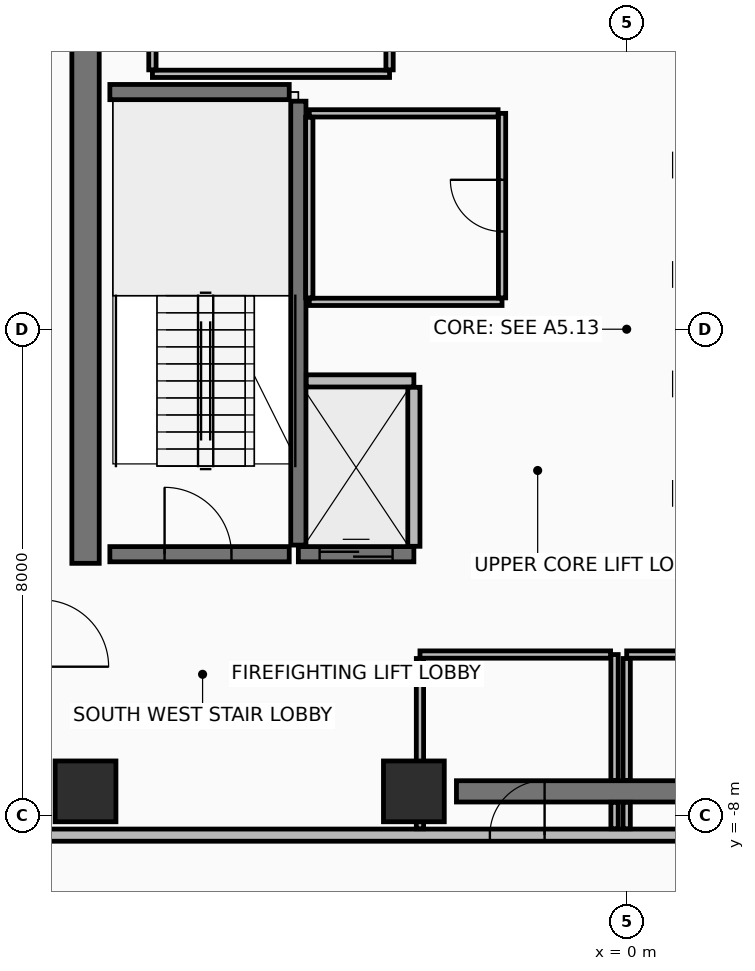
"""IFC4 building model, lengths in metres.
Left out: names, types, materials, properties, quantities, classifications, styles, units other than length and angle.
Written with IfcOpenShell. Run it as: python <this file> out.ifc"""

import sys

from ifc_helpers import new_model, si_unit, direction, frame, frame_2d, origin, origin_2d, place, context, subcontext, project, spatial, rectangle, extrude, element, fill, save


model = new_model("IFC4")
c1 = context("Model", 3, precision=1e-05, world=origin(), true_north=direction((0.0, 1.0)))
c2 = subcontext(c1, "Body", "Model", "MODEL_VIEW")
j1 = project(units=[si_unit("LENGTHUNIT", "METRE"), si_unit("PLANEANGLEUNIT", "RADIAN")], contexts=[c1])
p1 = place(None, origin())
s1 = spatial("IfcSite", under=j1, at=p1, CompositionType="ELEMENT")
p2 = place(p1, origin())
s2 = spatial("IfcBuilding", under=s1, at=p2, CompositionType="ELEMENT")
p3 = place(p2, frame((0.0, 0.0, 302.15)))
s3 = spatial("IfcBuildingStorey", under=s2, at=p3, CompositionType="ELEMENT", Elevation=302.15)
for number, where, z_axis, x_axis in (
    (1, (-8.9, -7.6, 0.0), (0.0, 0.0, 1.0), (1.0, 0.0, 0.0)),
    (2, (-3.5, -7.6, 0.0), (0.0, 0.0, 1.0), (1.0, 0.0, 0.0)),
):
    element("IfcColumn", number, at=place(p3, frame(where, z_axis=z_axis, x_axis=x_axis)), inside=s3, PredefinedType="COLUMN", context=c2, shape_type="SweptSolid", body=[
        extrude(rectangle(XDim=1.0, YDim=1.0, at=origin_2d()), origin(), (0.0, 0.0, 1.0), 4.15),
    ])
p4 = place(p3, frame((-2.8, -7.6, 0.0), z_axis=(0.0, 0.0, 1.0), x_axis=(1.0, 0.0, 0.0)))
e3 = element("IfcWall", 3, at=p4, inside=s3, PredefinedType="SHEAR", context=c2, shape_type="SweptSolid", body=[
    extrude(rectangle(XDim=5.38, YDim=0.35, at=frame_2d((2.69, 0.0))), origin(), (0.0, 0.0, 1.0), 3.95),
])
p5 = place(p3, frame((-8.9, -3.85, 0.0), z_axis=(0.0, 0.0, 1.0), x_axis=(0.0, 1.0, 0.0)))
e4 = element("IfcWall", 4, at=p5, inside=s3, PredefinedType="SHEAR", context=c2, shape_type="SweptSolid", body=[
    extrude(rectangle(XDim=10.7, YDim=0.45, at=frame_2d((5.35, 0.0))), origin(), (0.0, 0.0, 1.0), 3.95),
])
p6 = place(p3, frame((-9.62, -8.32, 0.0), z_axis=(0.0, 0.0, 1.0), x_axis=(1.0, 0.0, 0.0)))
e5 = element("IfcWall", 5, at=p6, inside=s3, PredefinedType="PARTITIONING", context=c2, shape_type="SweptSolid", body=[
    extrude(rectangle(XDim=19.24, YDim=0.2, at=frame_2d((9.62, 0.0))), origin(), (0.0, 0.0, 1.0), 3.445),
])
p7 = place(p6, frame((7.37, 0.0, 0.0)))
e6 = element("IfcOpeningElement", 6, at=p7, cuts=e5, PredefinedType="OPENING", context=c2, shape_type="SweptSolid", body=[
    extrude(rectangle(XDim=0.9, YDim=2.1, at=frame_2d((0.45, 1.05))), frame((0.0, 0.11, 0.0), z_axis=(0.0, -1.0, 0.0), x_axis=(1.0, 0.0, 0.0)), (0.0, 0.0, 1.0), 0.22),
])
p8 = place(p6, frame((10.77, 0.0, 0.0)))
e7 = element("IfcOpeningElement", 7, at=p8, cuts=e5, PredefinedType="OPENING", context=c2, shape_type="SweptSolid", body=[
    extrude(rectangle(XDim=0.9, YDim=2.1, at=frame_2d((0.45, 1.05))), frame((0.0, 0.11, 0.0), z_axis=(0.0, -1.0, 0.0), x_axis=(1.0, 0.0, 0.0)), (0.0, 0.0, 1.0), 0.22),
])
p9 = place(p3, frame((-5.4, -3.55, 0.0), z_axis=(0.0, 0.0, 1.0), x_axis=(0.0, 1.0, 0.0)))
e8 = element("IfcWall", 8, at=p9, inside=s3, PredefinedType="SHEAR", context=c2, shape_type="SweptSolid", body=[
    extrude(rectangle(XDim=7.3, YDim=0.25, at=frame_2d((3.65, 0.0))), origin(), (0.0, 0.0, 1.0), 3.95),
])
p10 = place(p3, frame((-8.5, -3.7, 0.0), z_axis=(0.0, 0.0, 1.0), x_axis=(1.0, 0.0, 0.0)))
e9 = element("IfcWall", 9, at=p10, inside=s3, PredefinedType="SHEAR", context=c2, shape_type="SweptSolid", body=[
    extrude(rectangle(XDim=2.95, YDim=0.25, at=frame_2d((1.475, 0.0))), origin(), (0.0, 0.0, 1.0), 3.95),
])
p11 = place(p10, frame((0.9, 0.0, 0.0)))
e10 = element("IfcOpeningElement", 10, at=p11, cuts=e9, PredefinedType="OPENING", context=c2, shape_type="SweptSolid", body=[
    extrude(rectangle(XDim=1.1, YDim=2.15, at=frame_2d((0.55, 1.075))), frame((0.0, 0.135, 0.0), z_axis=(0.0, -1.0, 0.0), x_axis=(1.0, 0.0, 0.0)), (0.0, 0.0, 1.0), 0.27),
])
p12 = place(p3, frame((-8.5, 3.9, 0.0), z_axis=(0.0, 0.0, 1.0), x_axis=(1.0, 0.0, 0.0)))
e11 = element("IfcWall", 11, at=p12, inside=s3, PredefinedType="SHEAR", context=c2, shape_type="SweptSolid", body=[
    extrude(rectangle(XDim=2.95, YDim=0.25, at=frame_2d((1.475, 0.0))), origin(), (0.0, 0.0, 1.0), 3.95),
])
p13 = place(p3, frame((-5.4, -3.7, 0.0), z_axis=(0.0, 0.0, 1.0), x_axis=(1.0, 0.0, 0.0)))
e12 = element("IfcWall", 12, at=p13, inside=s3, PredefinedType="SHEAR", context=c2, shape_type="SweptSolid", body=[
    extrude(rectangle(XDim=1.9, YDim=0.25, at=frame_2d((0.95, 0.0))), origin(), (0.0, 0.0, 1.0), 3.95),
])
p14 = place(p13, frame((0.35, 0.0, 0.0)))
e13 = element("IfcOpeningElement", 13, at=p14, cuts=e12, PredefinedType="OPENING", context=c2, shape_type="SweptSolid", body=[
    extrude(rectangle(XDim=1.2, YDim=2.2, at=frame_2d((0.6, 1.1))), frame((0.0, 0.135, 0.0), z_axis=(0.0, -1.0, 0.0), x_axis=(1.0, 0.0, 0.0)), (0.0, 0.0, 1.0), 0.27),
])
p15 = place(p3, frame((-5.27, -0.85, 0.0), z_axis=(0.0, 0.0, 1.0), x_axis=(1.0, 0.0, 0.0)))
e14 = element("IfcWall", 14, at=p15, inside=s3, PredefinedType="PARTITIONING", context=c2, shape_type="SweptSolid", body=[
    extrude(rectangle(XDim=1.77, YDim=0.2, at=frame_2d((0.885, 0.0))), origin(), (0.0, 0.0, 1.0), 3.95),
])
p16 = place(p3, frame((-3.5, -3.57, 0.0), z_axis=(0.0, 0.0, 1.0), x_axis=(0.0, 1.0, 0.0)))
e15 = element("IfcWall", 15, at=p16, inside=s3, PredefinedType="PARTITIONING", context=c2, shape_type="SweptSolid", body=[
    extrude(rectangle(XDim=2.615, YDim=0.2, at=frame_2d((1.308, 0.0))), origin(), (0.0, 0.0, 1.0), 3.95),
])
p17 = place(p3, frame((-5.22, 0.45, 0.0), z_axis=(0.0, 0.0, 1.0), x_axis=(1.0, 0.0, 0.0)))
e16 = element("IfcWall", 16, at=p17, inside=s3, PredefinedType="PARTITIONING", context=c2, shape_type="SweptSolid", body=[
    extrude(rectangle(XDim=3.17, YDim=0.12, at=frame_2d((1.585, 0.0))), origin(), (0.0, 0.0, 1.0), 3.95),
])
p18 = place(p3, frame((-2.05, 0.515, 0.0), z_axis=(0.0, 0.0, 1.0), x_axis=(0.0, 1.0, 0.0)))
e17 = element("IfcWall", 17, at=p18, inside=s3, PredefinedType="PARTITIONING", context=c2, shape_type="SweptSolid", body=[
    extrude(rectangle(XDim=3.035, YDim=0.12, at=frame_2d((1.518, 0.0))), origin(), (0.0, 0.0, 1.0), 3.95),
])
p19 = place(p18, frame((1.092, 0.0, 0.0)))
e18 = element("IfcOpeningElement", 18, at=p19, cuts=e17, PredefinedType="OPENING", context=c2, shape_type="SweptSolid", body=[
    extrude(rectangle(XDim=0.85, YDim=2.1, at=frame_2d((0.425, 1.05))), frame((0.0, 0.07, 0.0), z_axis=(0.0, -1.0, 0.0), x_axis=(1.0, 0.0, 0.0)), (0.0, 0.0, 1.0), 0.14),
])
p20 = place(p3, frame((-2.115, 3.55, 0.0), z_axis=(0.0, 0.0, 1.0), x_axis=(-1.0, 0.0, 0.0)))
e19 = element("IfcWall", 19, at=p20, inside=s3, PredefinedType="PARTITIONING", context=c2, shape_type="SweptSolid", body=[
    extrude(rectangle(XDim=3.105, YDim=0.12, at=frame_2d((1.552, 0.0))), origin(), (0.0, 0.0, 1.0), 3.95),
])
p21 = place(p3, frame((-5.22, 3.485, 0.0), z_axis=(0.0, 0.0, 1.0), x_axis=(0.0, -1.0, 0.0)))
e20 = element("IfcWall", 20, at=p21, inside=s3, PredefinedType="PARTITIONING", context=c2, shape_type="SweptSolid", body=[
    extrude(rectangle(XDim=2.97, YDim=0.12, at=frame_2d((1.485, 0.0))), origin(), (0.0, 0.0, 1.0), 3.95),
])
p22 = place(p3, frame((-0.2, -8.215, 0.0), z_axis=(0.0, 0.0, 1.0), x_axis=(0.0, 1.0, 0.0)))
e21 = element("IfcWall", 21, at=p22, inside=s3, PredefinedType="PARTITIONING", context=c2, shape_type="SweptSolid", body=[
    extrude(rectangle(XDim=0.435, YDim=0.12, at=frame_2d((0.218, 0.0))), origin(), (0.0, 0.0, 1.0), 3.245),
])
p23 = place(p3, frame((-0.2, -7.42, 0.0), z_axis=(0.0, 0.0, 1.0), x_axis=(0.0, 1.0, 0.0)))
e22 = element("IfcWall", 22, at=p23, inside=s3, PredefinedType="PARTITIONING", context=c2, shape_type="SweptSolid", body=[
    extrude(rectangle(XDim=2.07, YDim=0.12, at=frame_2d((1.035, 0.0))), origin(), (0.0, 0.0, 1.0), 3.245),
])
p24 = place(p3, frame((-0.265, -5.35, 0.0), z_axis=(0.0, 0.0, 1.0), x_axis=(-1.0, 0.0, 0.0)))
e23 = element("IfcWall", 23, at=p24, inside=s3, PredefinedType="PARTITIONING", context=c2, shape_type="SweptSolid", body=[
    extrude(rectangle(XDim=3.135, YDim=0.12, at=frame_2d((1.567, 0.0))), origin(), (0.0, 0.0, 1.0), 3.245),
])
p25 = place(p3, frame((-3.4, -5.415, 0.0), z_axis=(0.0, 0.0, 1.0), x_axis=(0.0, -1.0, 0.0)))
e24 = element("IfcWall", 24, at=p25, inside=s3, PredefinedType="PARTITIONING", context=c2, shape_type="SweptSolid", body=[
    extrude(rectangle(XDim=2.8, YDim=0.12, at=frame_2d((1.4, 0.0))), origin(), (0.0, 0.0, 1.0), 3.245),
])
p26 = place(p3, frame((3.135, -5.35, 0.0), z_axis=(0.0, 0.0, 1.0), x_axis=(-1.0, 0.0, 0.0)))
e25 = element("IfcWall", 25, at=p26, inside=s3, PredefinedType="PARTITIONING", context=c2, shape_type="SweptSolid", body=[
    extrude(rectangle(XDim=3.135, YDim=0.12, at=frame_2d((1.567, 0.0))), origin(), (0.0, 0.0, 1.0), 3.95),
])
p27 = place(p3, frame((0.0, -5.415, 0.0), z_axis=(0.0, 0.0, 1.0), x_axis=(0.0, -1.0, 0.0)))
e26 = element("IfcWall", 26, at=p27, inside=s3, PredefinedType="PARTITIONING", context=c2, shape_type="SweptSolid", body=[
    extrude(rectangle(XDim=2.005, YDim=0.12, at=frame_2d((1.002, 0.0))), origin(), (0.0, 0.0, 1.0), 3.245),
])
p28 = place(p3, frame((0.0, -7.78, 0.0), z_axis=(0.0, 0.0, 1.0), x_axis=(0.0, -1.0, 0.0)))
e27 = element("IfcWall", 27, at=p28, inside=s3, PredefinedType="PARTITIONING", context=c2, shape_type="SweptSolid", body=[
    extrude(rectangle(XDim=0.435, YDim=0.12, at=frame_2d((0.218, 0.0))), origin(), (0.0, 0.0, 1.0), 3.245),
])
p29 = place(p3, frame((-7.8, 4.2, 0.0), z_axis=(0.0, 0.0, 1.0), x_axis=(1.0, 0.0, 0.0)))
e28 = element("IfcWall", 28, at=p29, inside=s3, PredefinedType="PARTITIONING", context=c2, shape_type="SweptSolid", body=[
    extrude(rectangle(XDim=3.9, YDim=0.12, at=frame_2d((1.95, 0.0))), origin(), (0.0, 0.0, 1.0), 3.95),
])
for number, where, z_axis, x_axis in (
    (29, (-3.9, 4.265, 0.0), (0.0, 0.0, 1.0), (0.0, 1.0, 0.0)),
    (30, (-7.8, 8.215, 0.0), (0.0, 0.0, 1.0), (0.0, -1.0, 0.0)),
):
    element("IfcWall", number, at=place(p3, frame(where, z_axis=z_axis, x_axis=x_axis)), inside=s3, PredefinedType="PARTITIONING", context=c2, shape_type="SweptSolid", body=[
        extrude(rectangle(XDim=3.95, YDim=0.12, at=frame_2d((1.975, 0.0))), origin(), (0.0, 0.0, 1.0), 3.245),
    ])
p30 = place(p11, origin())
e31 = element("IfcDoor", 31, at=p30, inside=s3, OperationType="SINGLE_SWING_LEFT", PredefinedType="DOOR", context=c2, shape_type="SweptSolid", body=[
    extrude(rectangle(XDim=1.1, YDim=2.15, at=frame_2d((0.55, 1.075))), frame((0.0, 0.025, 0.0), z_axis=(0.0, -1.0, 0.0), x_axis=(1.0, 0.0, 0.0)), (0.0, 0.0, 1.0), 0.05),
])
fill(e10, e31)
p31 = place(p14, origin())
e32 = element("IfcDoor", 32, at=p31, inside=s3, OperationType="SLIDING_TO_RIGHT", PredefinedType="DOOR", context=c2, shape_type="SweptSolid", body=[
    extrude(rectangle(XDim=1.2, YDim=2.2, at=frame_2d((0.6, 1.1))), frame((0.0, 0.025, 0.0), z_axis=(0.0, -1.0, 0.0), x_axis=(1.0, 0.0, 0.0)), (0.0, 0.0, 1.0), 0.05),
])
fill(e13, e32)
p32 = place(p19, frame((0.85, 0.0, 0.0), z_axis=(0.0, 0.0, 1.0), x_axis=(-1.0, 0.0, 0.0)))
e33 = element("IfcDoor", 33, at=p32, inside=s3, OperationType="SINGLE_SWING_RIGHT", PredefinedType="DOOR", context=c2, shape_type="SweptSolid", body=[
    extrude(rectangle(XDim=0.85, YDim=2.1, at=frame_2d((0.425, 1.05))), frame((0.0, 0.025, 0.0), z_axis=(0.0, -1.0, 0.0), x_axis=(1.0, 0.0, 0.0)), (0.0, 0.0, 1.0), 0.05),
])
fill(e18, e33)
p33 = place(p7, frame((0.9, 0.0, 0.0), z_axis=(0.0, 0.0, 1.0), x_axis=(-1.0, 0.0, 0.0)))
e34 = element("IfcDoor", 34, at=p33, inside=s3, OperationType="SINGLE_SWING_LEFT", PredefinedType="DOOR", context=c2, shape_type="SweptSolid", body=[
    extrude(rectangle(XDim=0.9, YDim=2.1, at=frame_2d((0.45, 1.05))), frame((0.0, 0.025, 0.0), z_axis=(0.0, -1.0, 0.0), x_axis=(1.0, 0.0, 0.0)), (0.0, 0.0, 1.0), 0.05),
])
fill(e6, e34)
save(model, sys.argv[1])
